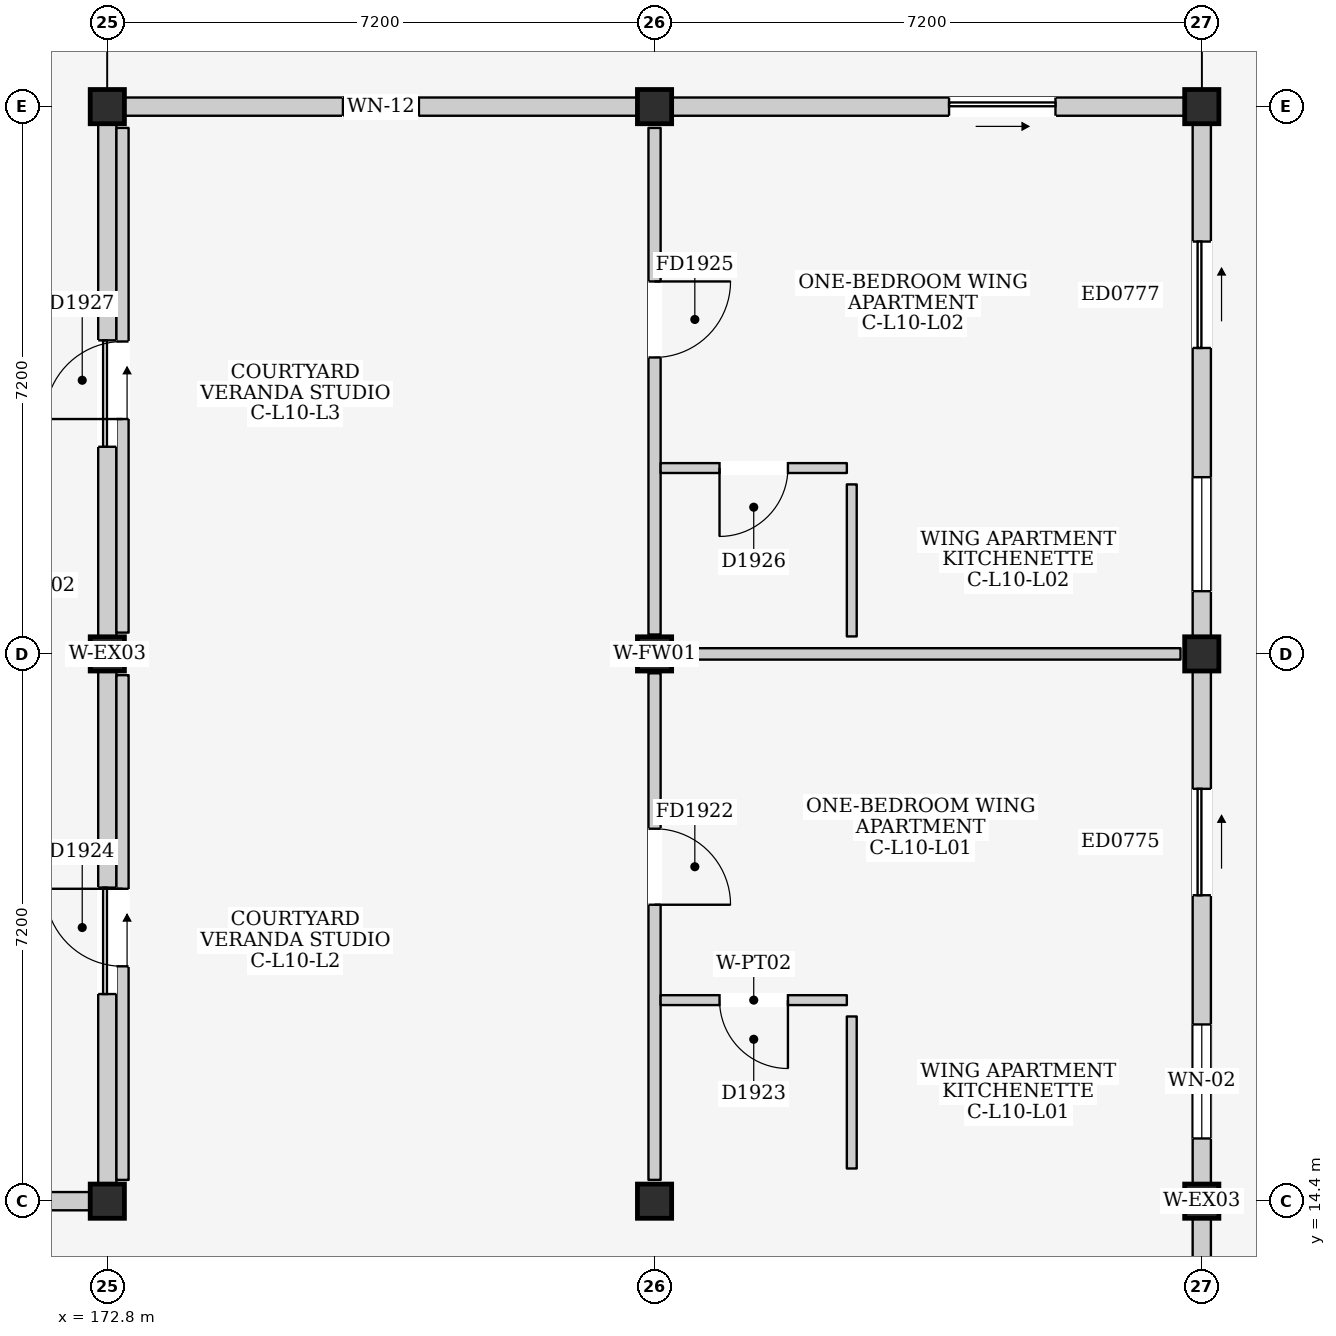
"""IFC4 building model, lengths in metres.
Left out: names, types, materials, properties, quantities, classifications, styles, units other than length and angle.
Written with IfcOpenShell. Run it as: python <this file> out.ifc"""

import sys

from ifc_helpers import new_model, si_unit, direction, frame, frame_2d, origin, origin_2d, place, context, subcontext, project, spatial, rectangle, extrude, element, fill, save


model = new_model("IFC4")
c1 = context("Model", 3, precision=1e-05, world=origin(), true_north=direction((0.0, 1.0)))
c2 = subcontext(c1, "Body", "Model", "MODEL_VIEW")
j1 = project(units=[si_unit("LENGTHUNIT", "METRE"), si_unit("PLANEANGLEUNIT", "RADIAN")], contexts=[c1])
p1 = place(None, origin())
s1 = spatial("IfcSite", under=j1, at=p1, CompositionType="ELEMENT")
p2 = place(p1, origin())
s2 = spatial("IfcBuilding", under=s1, at=p2, CompositionType="ELEMENT")
p3 = place(p2, frame((0.0, 0.0, 34.8)))
s3 = spatial("IfcBuildingStorey", under=s2, at=p3, CompositionType="ELEMENT", Elevation=34.8)
for number, where, z_axis, x_axis in (
    (1, (172.8, 14.4, 0.0), (0.0, 0.0, 1.0), (1.0, 0.0, 0.0)),
    (2, (172.8, 21.6, 0.0), (0.0, 0.0, 1.0), (1.0, 0.0, 0.0)),
    (3, (172.8, 28.8, 0.0), (0.0, 0.0, 1.0), (1.0, 0.0, 0.0)),
    (4, (180.0, 14.4, 0.0), (0.0, 0.0, 1.0), (1.0, 0.0, 0.0)),
    (5, (180.0, 21.6, 0.0), (0.0, 0.0, 1.0), (1.0, 0.0, 0.0)),
    (6, (180.0, 28.8, 0.0), (0.0, 0.0, 1.0), (1.0, 0.0, 0.0)),
    (7, (187.2, 14.4, 0.0), (0.0, 0.0, 1.0), (1.0, 0.0, 0.0)),
    (8, (187.2, 21.6, 0.0), (0.0, 0.0, 1.0), (1.0, 0.0, 0.0)),
    (9, (187.2, 28.8, 0.0), (0.0, 0.0, 1.0), (1.0, 0.0, 0.0)),
):
    element("IfcColumn", number, at=place(p3, frame(where, z_axis=z_axis, x_axis=x_axis)), inside=s3, PredefinedType="COLUMN", context=c2, shape_type="SweptSolid", body=[
        extrude(rectangle(XDim=0.45, YDim=0.45, at=origin_2d()), origin(), (0.0, 0.0, 1.0), 3.2),
    ])
p4 = place(p3, frame((165.825, 14.4, 0.0), z_axis=(0.0, 0.0, 1.0), x_axis=(1.0, 0.0, 0.0)))
e10 = element("IfcWall", 10, at=p4, inside=s3, PredefinedType="ELEMENTEDWALL", context=c2, shape_type="SweptSolid", body=[
    extrude(rectangle(XDim=6.75, YDim=0.24, at=frame_2d((3.375, 0.0))), origin(), (0.0, 0.0, 1.0), 2.345),
])
p5 = place(p4, frame((2.875, 0.0, 1.2)))
e11 = element("IfcOpeningElement", 11, at=p5, cuts=e10, PredefinedType="OPENING", context=c2, shape_type="SweptSolid", body=[
    extrude(rectangle(XDim=1.0, YDim=0.9, at=frame_2d((0.5, 0.45))), frame((0.0, 0.135, 0.0), z_axis=(0.0, -1.0, 0.0), x_axis=(1.0, 0.0, 0.0)), (0.0, 0.0, 1.0), 0.27),
])
p6 = place(p3, frame((172.8, 14.625, 0.0), z_axis=(0.0, 0.0, 1.0), x_axis=(0.0, 1.0, 0.0)))
e12 = element("IfcWall", 12, at=p6, inside=s3, PredefinedType="ELEMENTEDWALL", context=c2, shape_type="SweptSolid", body=[
    extrude(rectangle(XDim=6.75, YDim=0.24, at=frame_2d((3.375, 0.0))), origin(), (0.0, 0.0, 1.0), 2.445),
])
p7 = place(p6, frame((2.5, 0.0, 0.0)))
e13 = element("IfcOpeningElement", 13, at=p7, cuts=e12, PredefinedType="OPENING", context=c2, shape_type="SweptSolid", body=[
    extrude(rectangle(XDim=1.4, YDim=2.1, at=frame_2d((0.7, 1.05))), frame((0.0, 0.135, 0.0), z_axis=(0.0, -1.0, 0.0), x_axis=(1.0, 0.0, 0.0)), (0.0, 0.0, 1.0), 0.27),
])
p8 = place(p3, frame((173.025, 28.8, 0.0), z_axis=(0.0, 0.0, 1.0), x_axis=(1.0, 0.0, 0.0)))
e14 = element("IfcWall", 14, at=p8, inside=s3, PredefinedType="ELEMENTEDWALL", context=c2, shape_type="SweptSolid", body=[
    extrude(rectangle(XDim=6.75, YDim=0.24, at=frame_2d((3.375, 0.0))), origin(), (0.0, 0.0, 1.0), 2.345),
])
p9 = place(p8, frame((2.875, 0.0, 1.1)))
e15 = element("IfcOpeningElement", 15, at=p9, cuts=e14, PredefinedType="OPENING", context=c2, shape_type="SweptSolid", body=[
    extrude(rectangle(XDim=1.0, YDim=0.9, at=frame_2d((0.5, 0.45))), frame((0.0, 0.135, 0.0), z_axis=(0.0, -1.0, 0.0), x_axis=(1.0, 0.0, 0.0)), (0.0, 0.0, 1.0), 0.27),
])
p10 = place(p3, frame((172.8, 21.825, 0.0), z_axis=(0.0, 0.0, 1.0), x_axis=(0.0, 1.0, 0.0)))
e16 = element("IfcWall", 16, at=p10, inside=s3, PredefinedType="ELEMENTEDWALL", context=c2, shape_type="SweptSolid", body=[
    extrude(rectangle(XDim=6.75, YDim=0.24, at=frame_2d((3.375, 0.0))), origin(), (0.0, 0.0, 1.0), 2.445),
])
p11 = place(p10, frame((2.5, 0.0, 0.0)))
e17 = element("IfcOpeningElement", 17, at=p11, cuts=e16, PredefinedType="OPENING", context=c2, shape_type="SweptSolid", body=[
    extrude(rectangle(XDim=1.4, YDim=2.1, at=frame_2d((0.7, 1.05))), frame((0.0, 0.135, 0.0), z_axis=(0.0, -1.0, 0.0), x_axis=(1.0, 0.0, 0.0)), (0.0, 0.0, 1.0), 0.27),
])
p12 = place(p3, frame((187.2, 7.425, 0.0), z_axis=(0.0, 0.0, 1.0), x_axis=(0.0, 1.0, 0.0)))
e18 = element("IfcWall", 18, at=p12, inside=s3, PredefinedType="ELEMENTEDWALL", context=c2, shape_type="SweptSolid", body=[
    extrude(rectangle(XDim=6.75, YDim=0.24, at=frame_2d((3.375, 0.0))), origin(), (0.0, 0.0, 1.0), 2.495),
])
p13 = place(p12, frame((3.65, 0.0, 0.0)))
e19 = element("IfcOpeningElement", 19, at=p13, cuts=e18, PredefinedType="OPENING", context=c2, shape_type="SweptSolid", body=[
    extrude(rectangle(XDim=1.4, YDim=2.1, at=frame_2d((0.7, 1.05))), frame((0.0, 0.135, 0.0), z_axis=(0.0, -1.0, 0.0), x_axis=(1.0, 0.0, 0.0)), (0.0, 0.0, 1.0), 0.27),
])
p14 = place(p3, frame((187.2, 14.625, 0.0), z_axis=(0.0, 0.0, 1.0), x_axis=(0.0, 1.0, 0.0)))
e20 = element("IfcWall", 20, at=p14, inside=s3, PredefinedType="ELEMENTEDWALL", context=c2, shape_type="SweptSolid", body=[
    extrude(rectangle(XDim=6.75, YDim=0.24, at=frame_2d((3.375, 0.0))), origin(), (0.0, 0.0, 1.0), 2.495),
])
p15 = place(p14, frame((3.8, 0.0, 0.0)))
e21 = element("IfcOpeningElement", 21, at=p15, cuts=e20, PredefinedType="OPENING", context=c2, shape_type="SweptSolid", body=[
    extrude(rectangle(XDim=1.4, YDim=2.1, at=frame_2d((0.7, 1.05))), frame((0.0, 0.135, 0.0), z_axis=(0.0, -1.0, 0.0), x_axis=(1.0, 0.0, 0.0)), (0.0, 0.0, 1.0), 0.27),
])
p16 = place(p14, frame((0.6, 0.0, 0.885)))
e22 = element("IfcOpeningElement", 22, at=p16, cuts=e20, PredefinedType="OPENING", context=c2, shape_type="SweptSolid", body=[
    extrude(rectangle(XDim=1.5, YDim=1.5, at=frame_2d((0.75, 0.75))), frame((0.0, 0.135, 0.0), z_axis=(0.0, -1.0, 0.0), x_axis=(1.0, 0.0, 0.0)), (0.0, 0.0, 1.0), 0.27),
])
p17 = place(p3, frame((180.225, 28.8, 0.0), z_axis=(0.0, 0.0, 1.0), x_axis=(1.0, 0.0, 0.0)))
e23 = element("IfcWall", 23, at=p17, inside=s3, PredefinedType="ELEMENTEDWALL", context=c2, shape_type="SweptSolid", body=[
    extrude(rectangle(XDim=6.75, YDim=0.24, at=frame_2d((3.375, 0.0))), origin(), (0.0, 0.0, 1.0), 2.345),
])
p18 = place(p17, frame((3.65, 0.0, 0.0)))
e24 = element("IfcOpeningElement", 24, at=p18, cuts=e23, PredefinedType="OPENING", context=c2, shape_type="SweptSolid", body=[
    extrude(rectangle(XDim=1.4, YDim=2.1, at=frame_2d((0.7, 1.05))), frame((0.0, 0.135, 0.0), z_axis=(0.0, -1.0, 0.0), x_axis=(1.0, 0.0, 0.0)), (0.0, 0.0, 1.0), 0.27),
])
p19 = place(p3, frame((187.2, 21.825, 0.0), z_axis=(0.0, 0.0, 1.0), x_axis=(0.0, 1.0, 0.0)))
e25 = element("IfcWall", 25, at=p19, inside=s3, PredefinedType="ELEMENTEDWALL", context=c2, shape_type="SweptSolid", body=[
    extrude(rectangle(XDim=6.75, YDim=0.24, at=frame_2d((3.375, 0.0))), origin(), (0.0, 0.0, 1.0), 2.495),
])
p20 = place(p19, frame((3.8, 0.0, 0.0)))
e26 = element("IfcOpeningElement", 26, at=p20, cuts=e25, PredefinedType="OPENING", context=c2, shape_type="SweptSolid", body=[
    extrude(rectangle(XDim=1.4, YDim=2.1, at=frame_2d((0.7, 1.05))), frame((0.0, 0.135, 0.0), z_axis=(0.0, -1.0, 0.0), x_axis=(1.0, 0.0, 0.0)), (0.0, 0.0, 1.0), 0.27),
])
p21 = place(p19, frame((0.6, 0.0, 0.885)))
e27 = element("IfcOpeningElement", 27, at=p21, cuts=e25, PredefinedType="OPENING", context=c2, shape_type="SweptSolid", body=[
    extrude(rectangle(XDim=1.5, YDim=1.5, at=frame_2d((0.75, 0.75))), frame((0.0, 0.135, 0.0), z_axis=(0.0, -1.0, 0.0), x_axis=(1.0, 0.0, 0.0)), (0.0, 0.0, 1.0), 0.27),
])
p22 = place(p3, frame((180.0, 14.68, 0.0), z_axis=(0.0, 0.0, 1.0), x_axis=(0.0, 1.0, 0.0)))
e28 = element("IfcWall", 28, at=p22, inside=s3, PredefinedType="PARTITIONING", context=c2, shape_type="SweptSolid", body=[
    extrude(rectangle(XDim=6.665, YDim=0.16, at=frame_2d((3.333, 0.0))), origin(), (0.0, 0.0, 1.0), 2.445),
])
p23 = place(p22, frame((3.62, 0.0, 0.0)))
e29 = element("IfcOpeningElement", 29, at=p23, cuts=e28, PredefinedType="OPENING", context=c2, shape_type="SweptSolid", body=[
    extrude(rectangle(XDim=1.0, YDim=2.15, at=frame_2d((0.5, 1.075))), frame((0.0, 0.095, 0.0), z_axis=(0.0, -1.0, 0.0), x_axis=(1.0, 0.0, 0.0)), (0.0, 0.0, 1.0), 0.19),
])
p24 = place(p3, frame((180.28, 21.6, 0.0), z_axis=(0.0, 0.0, 1.0), x_axis=(1.0, 0.0, 0.0)))
e30 = element("IfcWall", 30, at=p24, inside=s3, PredefinedType="PARTITIONING", context=c2, shape_type="SweptSolid", body=[
    extrude(rectangle(XDim=6.64, YDim=0.15, at=frame_2d((3.32, 0.0))), origin(), (0.0, 0.0, 1.0), 2.345),
])
p25 = place(p3, frame((180.08, 17.045, 0.0), z_axis=(0.0, 0.0, 1.0), x_axis=(1.0, 0.0, 0.0)))
e31 = element("IfcWall", 31, at=p25, inside=s3, PredefinedType="PARTITIONING", context=c2, shape_type="SweptSolid", body=[
    extrude(rectangle(XDim=2.45, YDim=0.13, at=frame_2d((1.225, 0.0))), origin(), (0.0, 0.0, 1.0), 2.96),
])
p26 = place(p25, frame((0.775, 0.0, 0.0)))
e32 = element("IfcOpeningElement", 32, at=p26, cuts=e31, PredefinedType="OPENING", context=c2, shape_type="SweptSolid", body=[
    extrude(rectangle(XDim=0.9, YDim=2.1, at=frame_2d((0.45, 1.05))), frame((0.0, 0.08, 0.0), z_axis=(0.0, -1.0, 0.0), x_axis=(1.0, 0.0, 0.0)), (0.0, 0.0, 1.0), 0.16),
])
p27 = place(p3, frame((182.595, 14.83, 0.0), z_axis=(0.0, 0.0, 1.0), x_axis=(0.0, 1.0, 0.0)))
e33 = element("IfcWall", 33, at=p27, inside=s3, PredefinedType="PARTITIONING", context=c2, shape_type="SweptSolid", body=[
    extrude(rectangle(XDim=2.0, YDim=0.13, at=frame_2d((1.0, 0.0))), origin(), (0.0, 0.0, 1.0), 2.96),
])
p28 = place(p3, frame((173.0, 14.68, 0.0), z_axis=(0.0, 0.0, 1.0), x_axis=(0.0, 1.0, 0.0)))
e34 = element("IfcWall", 34, at=p28, inside=s3, PredefinedType="PARTITIONING", context=c2, shape_type="SweptSolid", body=[
    extrude(rectangle(XDim=6.64, YDim=0.16, at=frame_2d((3.32, 0.0))), origin(), (0.0, 0.0, 1.0), 2.96),
])
p29 = place(p28, frame((2.81, 0.0, 0.0)))
e35 = element("IfcOpeningElement", 35, at=p29, cuts=e34, PredefinedType="OPENING", context=c2, shape_type="SweptSolid", body=[
    extrude(rectangle(XDim=1.02, YDim=2.18, at=frame_2d((0.51, 1.09))), frame((0.0, 0.095, 0.0), z_axis=(0.0, -1.0, 0.0), x_axis=(1.0, 0.0, 0.0)), (0.0, 0.0, 1.0), 0.19),
])
p30 = place(p3, frame((180.0, 21.855, 0.0), z_axis=(0.0, 0.0, 1.0), x_axis=(0.0, 1.0, 0.0)))
e36 = element("IfcWall", 36, at=p30, inside=s3, PredefinedType="PARTITIONING", context=c2, shape_type="SweptSolid", body=[
    extrude(rectangle(XDim=6.665, YDim=0.16, at=frame_2d((3.333, 0.0))), origin(), (0.0, 0.0, 1.0), 2.445),
])
p31 = place(p30, frame((3.645, 0.0, 0.0)))
e37 = element("IfcOpeningElement", 37, at=p31, cuts=e36, PredefinedType="OPENING", context=c2, shape_type="SweptSolid", body=[
    extrude(rectangle(XDim=1.0, YDim=2.15, at=frame_2d((0.5, 1.075))), frame((0.0, 0.095, 0.0), z_axis=(0.0, -1.0, 0.0), x_axis=(1.0, 0.0, 0.0)), (0.0, 0.0, 1.0), 0.19),
])
p32 = place(p3, frame((180.08, 24.045, 0.0), z_axis=(0.0, 0.0, 1.0), x_axis=(1.0, 0.0, 0.0)))
e38 = element("IfcWall", 38, at=p32, inside=s3, PredefinedType="PARTITIONING", context=c2, shape_type="SweptSolid", body=[
    extrude(rectangle(XDim=2.45, YDim=0.13, at=frame_2d((1.225, 0.0))), origin(), (0.0, 0.0, 1.0), 2.96),
])
p33 = place(p32, frame((0.775, 0.0, 0.0)))
e39 = element("IfcOpeningElement", 39, at=p33, cuts=e38, PredefinedType="OPENING", context=c2, shape_type="SweptSolid", body=[
    extrude(rectangle(XDim=0.9, YDim=2.1, at=frame_2d((0.45, 1.05))), frame((0.0, 0.08, 0.0), z_axis=(0.0, -1.0, 0.0), x_axis=(1.0, 0.0, 0.0)), (0.0, 0.0, 1.0), 0.16),
])
p34 = place(p3, frame((182.595, 21.83, 0.0), z_axis=(0.0, 0.0, 1.0), x_axis=(0.0, 1.0, 0.0)))
e40 = element("IfcWall", 40, at=p34, inside=s3, PredefinedType="PARTITIONING", context=c2, shape_type="SweptSolid", body=[
    extrude(rectangle(XDim=2.0, YDim=0.13, at=frame_2d((1.0, 0.0))), origin(), (0.0, 0.0, 1.0), 2.96),
])
p35 = place(p3, frame((173.0, 21.88, 0.0), z_axis=(0.0, 0.0, 1.0), x_axis=(0.0, 1.0, 0.0)))
e41 = element("IfcWall", 41, at=p35, inside=s3, PredefinedType="PARTITIONING", context=c2, shape_type="SweptSolid", body=[
    extrude(rectangle(XDim=6.64, YDim=0.16, at=frame_2d((3.32, 0.0))), origin(), (0.0, 0.0, 1.0), 2.96),
])
p36 = place(p35, frame((2.81, 0.0, 0.0)))
e42 = element("IfcOpeningElement", 42, at=p36, cuts=e41, PredefinedType="OPENING", context=c2, shape_type="SweptSolid", body=[
    extrude(rectangle(XDim=1.02, YDim=2.18, at=frame_2d((0.51, 1.09))), frame((0.0, 0.095, 0.0), z_axis=(0.0, -1.0, 0.0), x_axis=(1.0, 0.0, 0.0)), (0.0, 0.0, 1.0), 0.19),
])
p37 = place(p7, frame((1.4, 0.0, 0.0), z_axis=(0.0, 0.0, 1.0), x_axis=(-1.0, 0.0, 0.0)))
e43 = element("IfcDoor", 43, at=p37, inside=s3, OperationType="SLIDING_TO_RIGHT", PredefinedType="DOOR", context=c2, shape_type="SweptSolid", body=[
    extrude(rectangle(XDim=1.4, YDim=2.1, at=frame_2d((0.7, 1.05))), frame((0.0, 0.025, 0.0), z_axis=(0.0, -1.0, 0.0), x_axis=(1.0, 0.0, 0.0)), (0.0, 0.0, 1.0), 0.05),
])
fill(e13, e43)
p38 = place(p9, origin())
e44 = element("IfcWindow", 44, at=p38, inside=s3, PartitioningType="SINGLE_PANEL", PredefinedType="WINDOW", context=c2, shape_type="SweptSolid", body=[
    extrude(rectangle(XDim=1.0, YDim=0.9, at=frame_2d((0.5, 0.45))), frame((0.0, 0.03, 0.0), z_axis=(0.0, -1.0, 0.0), x_axis=(1.0, 0.0, 0.0)), (0.0, 0.0, 1.0), 0.06),
])
fill(e15, e44)
p39 = place(p11, frame((1.4, 0.0, 0.0), z_axis=(0.0, 0.0, 1.0), x_axis=(-1.0, 0.0, 0.0)))
e45 = element("IfcDoor", 45, at=p39, inside=s3, OperationType="SLIDING_TO_RIGHT", PredefinedType="DOOR", context=c2, shape_type="SweptSolid", body=[
    extrude(rectangle(XDim=1.4, YDim=2.1, at=frame_2d((0.7, 1.05))), frame((0.0, 0.025, 0.0), z_axis=(0.0, -1.0, 0.0), x_axis=(1.0, 0.0, 0.0)), (0.0, 0.0, 1.0), 0.05),
])
fill(e17, e45)
p40 = place(p15, frame((1.4, 0.0, 0.0), z_axis=(0.0, 0.0, 1.0), x_axis=(-1.0, 0.0, 0.0)))
e46 = element("IfcDoor", 46, at=p40, inside=s3, OperationType="SLIDING_TO_RIGHT", PredefinedType="DOOR", context=c2, shape_type="SweptSolid", body=[
    extrude(rectangle(XDim=1.4, YDim=2.1, at=frame_2d((0.7, 1.05))), frame((0.0, 0.025, 0.0), z_axis=(0.0, -1.0, 0.0), x_axis=(1.0, 0.0, 0.0)), (0.0, 0.0, 1.0), 0.05),
])
fill(e21, e46)
p41 = place(p16, origin())
e47 = element("IfcWindow", 47, at=p41, inside=s3, PartitioningType="DOUBLE_PANEL_VERTICAL", PredefinedType="WINDOW", context=c2, shape_type="SweptSolid", body=[
    extrude(rectangle(XDim=1.5, YDim=1.5, at=frame_2d((0.75, 0.75))), frame((0.0, 0.03, 0.0), z_axis=(0.0, -1.0, 0.0), x_axis=(1.0, 0.0, 0.0)), (0.0, 0.0, 1.0), 0.06),
])
fill(e22, e47)
p42 = place(p18, frame((1.4, 0.0, 0.0), z_axis=(0.0, 0.0, 1.0), x_axis=(-1.0, 0.0, 0.0)))
e48 = element("IfcDoor", 48, at=p42, inside=s3, OperationType="SLIDING_TO_RIGHT", PredefinedType="DOOR", context=c2, shape_type="SweptSolid", body=[
    extrude(rectangle(XDim=1.4, YDim=2.1, at=frame_2d((0.7, 1.05))), frame((0.0, 0.025, 0.0), z_axis=(0.0, -1.0, 0.0), x_axis=(1.0, 0.0, 0.0)), (0.0, 0.0, 1.0), 0.05),
])
fill(e24, e48)
p43 = place(p20, frame((1.4, 0.0, 0.0), z_axis=(0.0, 0.0, 1.0), x_axis=(-1.0, 0.0, 0.0)))
e49 = element("IfcDoor", 49, at=p43, inside=s3, OperationType="SLIDING_TO_RIGHT", PredefinedType="DOOR", context=c2, shape_type="SweptSolid", body=[
    extrude(rectangle(XDim=1.4, YDim=2.1, at=frame_2d((0.7, 1.05))), frame((0.0, 0.025, 0.0), z_axis=(0.0, -1.0, 0.0), x_axis=(1.0, 0.0, 0.0)), (0.0, 0.0, 1.0), 0.05),
])
fill(e26, e49)
p44 = place(p21, origin())
e50 = element("IfcWindow", 50, at=p44, inside=s3, PartitioningType="DOUBLE_PANEL_VERTICAL", PredefinedType="WINDOW", context=c2, shape_type="SweptSolid", body=[
    extrude(rectangle(XDim=1.5, YDim=1.5, at=frame_2d((0.75, 0.75))), frame((0.0, 0.03, 0.0), z_axis=(0.0, -1.0, 0.0), x_axis=(1.0, 0.0, 0.0)), (0.0, 0.0, 1.0), 0.06),
])
fill(e27, e50)
p45 = place(p23, frame((1.0, 0.0, 0.0), z_axis=(0.0, 0.0, 1.0), x_axis=(-1.0, 0.0, 0.0)))
e51 = element("IfcDoor", 51, at=p45, inside=s3, OperationType="SINGLE_SWING_RIGHT", PredefinedType="DOOR", context=c2, shape_type="SweptSolid", body=[
    extrude(rectangle(XDim=1.0, YDim=2.15, at=frame_2d((0.5, 1.075))), frame((0.0, 0.025, 0.0), z_axis=(0.0, -1.0, 0.0), x_axis=(1.0, 0.0, 0.0)), (0.0, 0.0, 1.0), 0.05),
])
fill(e29, e51)
p46 = place(p26, frame((0.9, 0.0, 0.0), z_axis=(0.0, 0.0, 1.0), x_axis=(-1.0, 0.0, 0.0)))
e52 = element("IfcDoor", 52, at=p46, inside=s3, OperationType="SINGLE_SWING_LEFT", PredefinedType="DOOR", context=c2, shape_type="SweptSolid", body=[
    extrude(rectangle(XDim=0.9, YDim=2.1, at=frame_2d((0.45, 1.05))), frame((0.0, 0.025, 0.0), z_axis=(0.0, -1.0, 0.0), x_axis=(1.0, 0.0, 0.0)), (0.0, 0.0, 1.0), 0.05),
])
fill(e32, e52)
p47 = place(p29, origin())
e53 = element("IfcDoor", 53, at=p47, inside=s3, OperationType="SINGLE_SWING_RIGHT", PredefinedType="DOOR", context=c2, shape_type="SweptSolid", body=[
    extrude(rectangle(XDim=1.02, YDim=2.18, at=frame_2d((0.51, 1.09))), frame((0.0, 0.025, 0.0), z_axis=(0.0, -1.0, 0.0), x_axis=(1.0, 0.0, 0.0)), (0.0, 0.0, 1.0), 0.05),
])
fill(e35, e53)
p48 = place(p31, frame((1.0, 0.0, 0.0), z_axis=(0.0, 0.0, 1.0), x_axis=(-1.0, 0.0, 0.0)))
e54 = element("IfcDoor", 54, at=p48, inside=s3, OperationType="SINGLE_SWING_LEFT", PredefinedType="DOOR", context=c2, shape_type="SweptSolid", body=[
    extrude(rectangle(XDim=1.0, YDim=2.15, at=frame_2d((0.5, 1.075))), frame((0.0, 0.025, 0.0), z_axis=(0.0, -1.0, 0.0), x_axis=(1.0, 0.0, 0.0)), (0.0, 0.0, 1.0), 0.05),
])
fill(e37, e54)
p49 = place(p33, frame((0.9, 0.0, 0.0), z_axis=(0.0, 0.0, 1.0), x_axis=(-1.0, 0.0, 0.0)))
e55 = element("IfcDoor", 55, at=p49, inside=s3, OperationType="SINGLE_SWING_RIGHT", PredefinedType="DOOR", context=c2, shape_type="SweptSolid", body=[
    extrude(rectangle(XDim=0.9, YDim=2.1, at=frame_2d((0.45, 1.05))), frame((0.0, 0.025, 0.0), z_axis=(0.0, -1.0, 0.0), x_axis=(1.0, 0.0, 0.0)), (0.0, 0.0, 1.0), 0.05),
])
fill(e39, e55)
p50 = place(p36, origin())
e56 = element("IfcDoor", 56, at=p50, inside=s3, OperationType="SINGLE_SWING_LEFT", PredefinedType="DOOR", context=c2, shape_type="SweptSolid", body=[
    extrude(rectangle(XDim=1.02, YDim=2.18, at=frame_2d((0.51, 1.09))), frame((0.0, 0.025, 0.0), z_axis=(0.0, -1.0, 0.0), x_axis=(1.0, 0.0, 0.0)), (0.0, 0.0, 1.0), 0.05),
])
fill(e42, e56)
save(model, sys.argv[1])
